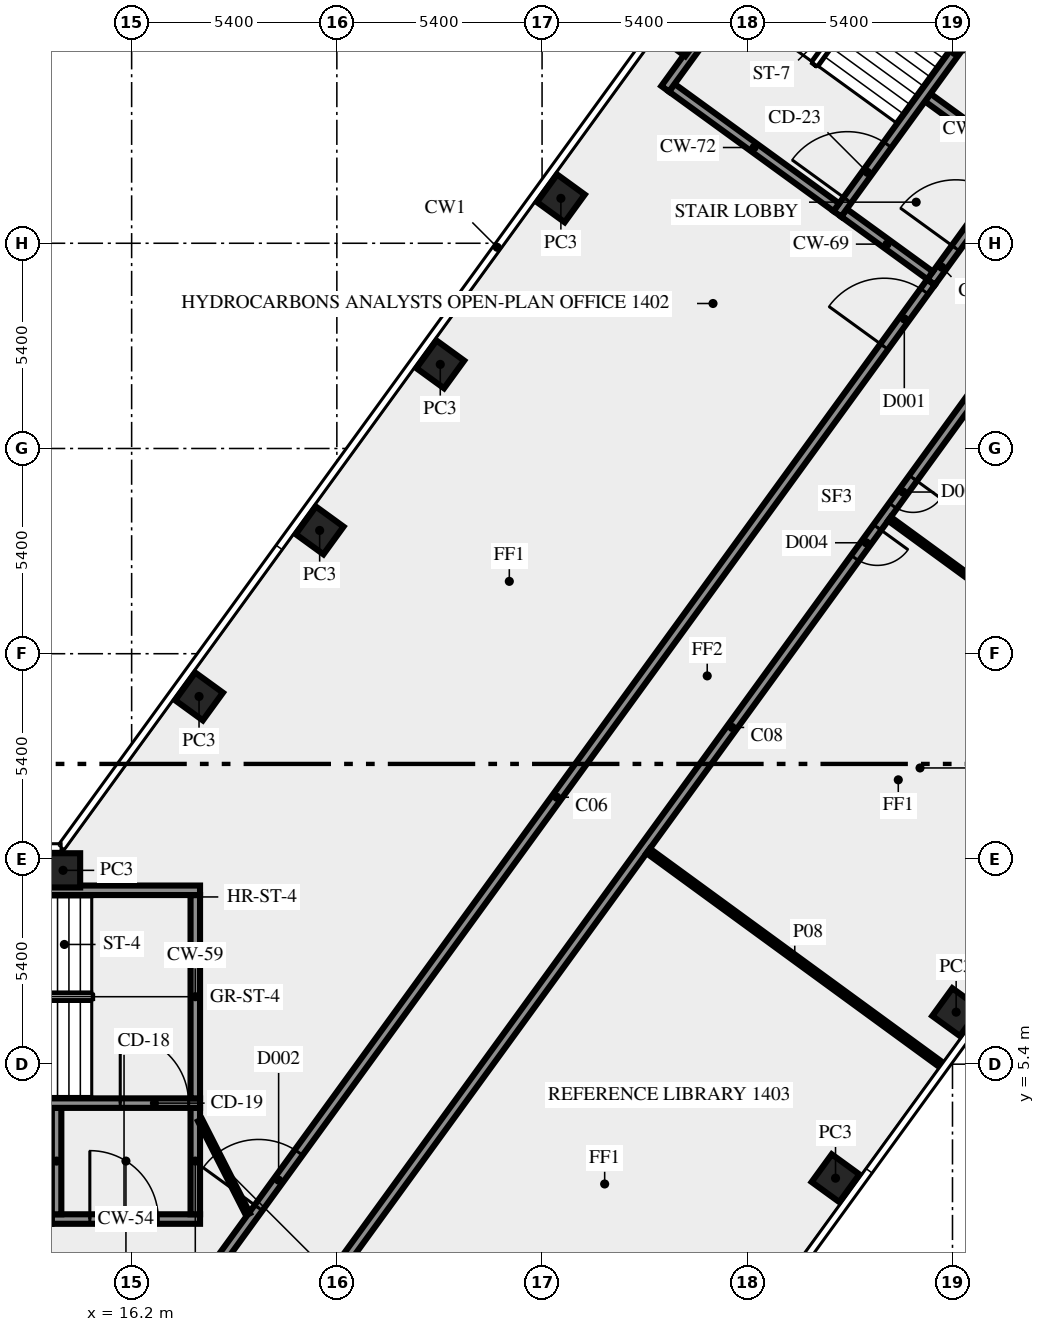
"""IFC4 building model, lengths in metres.
Left out: names, types, materials, properties, quantities, classifications, styles, units other than length and angle.
Written with IfcOpenShell. Run it as: python <this file> out.ifc"""

import sys

from ifc_helpers import new_model, si_unit, direction, frame, frame_2d, origin, origin_2d, place, context, subcontext, project, spatial, rectangle, extrude, element, fill, save


model = new_model("IFC4")
c1 = context("Model", 3, precision=1e-05, world=origin(), true_north=direction((0.0, 1.0)))
c2 = subcontext(c1, "Body", "Model", "MODEL_VIEW")
j1 = project(units=[si_unit("LENGTHUNIT", "METRE"), si_unit("PLANEANGLEUNIT", "RADIAN")], contexts=[c1])
p1 = place(None, origin())
s1 = spatial("IfcSite", under=j1, at=p1, CompositionType="ELEMENT")
p2 = place(p1, origin())
s2 = spatial("IfcBuilding", under=s1, at=p2, CompositionType="ELEMENT")
p3 = place(p2, frame((0.0, 0.0, 63.0)))
s3 = spatial("IfcBuildingStorey", under=s2, at=p3, CompositionType="ELEMENT", Elevation=63.0)
for number, where, z_axis, x_axis in (
    (1, (34.722, 2.4, 0.0), (0.0, 0.0, 1.0), (0.588, 0.809, 0.0)),
    (2, (37.896, 6.769, 0.0), (0.0, 0.0, 1.0), (0.588, 0.809, 0.0)),
    (3, (30.669, 32.55, 0.0), (0.0, 0.0, 1.0), (-0.588, -0.809, 0.0)),
    (4, (27.495, 28.181, 0.0), (0.0, 0.0, 1.0), (-0.588, -0.809, 0.0)),
    (5, (24.321, 23.812, 0.0), (0.0, 0.0, 1.0), (-0.588, -0.809, 0.0)),
    (6, (21.147, 19.444, 0.0), (0.0, 0.0, 1.0), (-0.588, -0.809, 0.0)),
    (7, (17.974, 15.075, 0.0), (0.0, 0.0, 1.0), (-0.588, -0.809, 0.0)),
    (8, (14.395, 10.5, 0.0), (0.0, 0.0, 1.0), (-1.0, 0.0, 0.0)),
):
    element("IfcColumn", number, at=place(p3, frame(where, z_axis=z_axis, x_axis=x_axis)), inside=s3, PredefinedType="COLUMN", context=c2, shape_type="SweptSolid", body=[
        extrude(rectangle(XDim=0.9, YDim=0.9, at=origin_2d()), origin(), (0.0, 0.0, 1.0), 3.65),
    ])
p4 = place(p3, frame((14.1, 1.325, 0.0), z_axis=(0.0, 0.0, 1.0), x_axis=(1.0, 0.0, 0.0)))
e9 = element("IfcWall", 9, at=p4, inside=s3, PredefinedType="SHEAR", context=c2, shape_type="SweptSolid", body=[
    extrude(rectangle(XDim=3.9, YDim=0.25, at=frame_2d((1.95, 0.0))), origin(), (0.0, 0.0, 1.0), 3.65),
])
p5 = place(p4, frame((1.0, 0.0, 0.0)))
e10 = element("IfcOpeningElement", 10, at=p5, cuts=e9, PredefinedType="OPENING", context=c2, shape_type="SweptSolid", body=[
    extrude(rectangle(XDim=1.8, YDim=2.1, at=frame_2d((0.9, 1.05))), frame((0.0, 0.135, 0.0), z_axis=(0.0, -1.0, 0.0), x_axis=(1.0, 0.0, 0.0)), (0.0, 0.0, 1.0), 0.27),
])
for number, where, z_axis, x_axis in (
    (11, (14.225, 1.45, 0.0), (0.0, 0.0, 1.0), (0.0, 1.0, 0.0)),
    (12, (17.875, 1.45, 0.0), (0.0, 0.0, 1.0), (0.0, 1.0, 0.0)),
):
    element("IfcWall", number, at=place(p3, frame(where, z_axis=z_axis, x_axis=x_axis)), inside=s3, PredefinedType="SHEAR", context=c2, shape_type="SweptSolid", body=[
        extrude(rectangle(XDim=2.8, YDim=0.25, at=frame_2d((1.4, 0.0))), origin(), (0.0, 0.0, 1.0), 3.65),
    ])
p6 = place(p3, frame((7.5, 4.375, 0.0), z_axis=(0.0, 0.0, 1.0), x_axis=(1.0, 0.0, 0.0)))
e13 = element("IfcWall", 13, at=p6, inside=s3, PredefinedType="SHEAR", context=c2, shape_type="SweptSolid", body=[
    extrude(rectangle(XDim=10.5, YDim=0.25, at=frame_2d((5.25, 0.0))), origin(), (0.0, 0.0, 1.0), 3.65),
])
p7 = place(p6, frame((8.4, 0.0, 0.0)))
e14 = element("IfcOpeningElement", 14, at=p7, cuts=e13, PredefinedType="OPENING", context=c2, shape_type="SweptSolid", body=[
    extrude(rectangle(XDim=1.8, YDim=2.1, at=frame_2d((0.9, 1.05))), frame((0.0, 0.135, 0.0), z_axis=(0.0, -1.0, 0.0), x_axis=(1.0, 0.0, 0.0)), (0.0, 0.0, 1.0), 0.27),
])
p8 = place(p3, frame((17.875, 4.5, 0.0), z_axis=(0.0, 0.0, 1.0), x_axis=(0.0, 1.0, 0.0)))
e15 = element("IfcWall", 15, at=p8, inside=s3, PredefinedType="SHEAR", context=c2, shape_type="SweptSolid", body=[
    extrude(rectangle(XDim=5.35, YDim=0.25, at=frame_2d((2.675, 0.0))), origin(), (0.0, 0.0, 1.0), 3.65),
])
p9 = place(p3, frame((7.5, 9.975, 0.0), z_axis=(0.0, 0.0, 1.0), x_axis=(1.0, 0.0, 0.0)))
e16 = element("IfcWall", 16, at=p9, inside=s3, PredefinedType="SHEAR", context=c2, shape_type="SweptSolid", body=[
    extrude(rectangle(XDim=10.5, YDim=0.25, at=frame_2d((5.25, 0.0))), origin(), (0.0, 0.0, 1.0), 3.65),
])
p10 = place(p9, frame((2.0, 0.0, 1.0)))
e17 = element("IfcOpeningElement", 17, at=p10, cuts=e16, PredefinedType="OPENING", context=c2, shape_type="SweptSolid", body=[
    extrude(rectangle(XDim=1.2, YDim=1.2, at=frame_2d((0.6, 0.6))), frame((0.0, 0.135, 0.0), z_axis=(0.0, -1.0, 0.0), x_axis=(1.0, 0.0, 0.0)), (0.0, 0.0, 1.0), 0.27),
])
p11 = place(p3, frame((37.238, 25.98, 0.0), z_axis=(0.0, 0.0, 1.0), x_axis=(0.587772420479, 0.809026317077, 0.0)))
e18 = element("IfcWall", 18, at=p11, inside=s3, PredefinedType="SHEAR", context=c2, shape_type="SweptSolid", body=[
    extrude(rectangle(XDim=4.0, YDim=0.25, at=frame_2d((2.0, 0.0))), origin(), (0.0, 0.0, 1.0), 3.65),
])
p12 = place(p11, frame((1.1, 0.0, 0.0)))
e19 = element("IfcOpeningElement", 19, at=p12, cuts=e18, PredefinedType="OPENING", context=c2, shape_type="SweptSolid", body=[
    extrude(rectangle(XDim=1.8, YDim=2.1, at=frame_2d((0.9, 1.05))), frame((0.0, 0.135, 0.0), z_axis=(0.0, -1.0, 0.0), x_axis=(1.0, 0.0, 0.0)), (0.0, 0.0, 1.0), 0.27),
])
for number, where, z_axis, x_axis in (
    (20, (37.21, 26.154, 0.0), (0.0, 0.0, 1.0), (-0.809, 0.588, 0.0)),
    (21, (39.414, 29.188, 0.0), (0.0, 0.0, 1.0), (-0.809, 0.588, 0.0)),
):
    element("IfcWall", number, at=place(p3, frame(where, z_axis=z_axis, x_axis=x_axis)), inside=s3, PredefinedType="SHEAR", context=c2, shape_type="SweptSolid", body=[
        extrude(rectangle(XDim=2.8, YDim=0.25, at=frame_2d((1.4, 0.0))), origin(), (0.0, 0.0, 1.0), 3.65),
    ])
p13 = place(p3, frame((34.77, 27.772, 0.0), z_axis=(0.0, 0.0, 1.0), x_axis=(0.587795589702, 0.809009483706, 0.0)))
e22 = element("IfcWall", 22, at=p13, inside=s3, PredefinedType="SHEAR", context=c2, shape_type="SweptSolid", body=[
    extrude(rectangle(XDim=10.5, YDim=0.25, at=frame_2d((5.25, 0.0))), origin(), (0.0, 0.0, 1.0), 3.65),
])
p14 = place(p13, frame((0.45, 0.0, 0.0)))
e23 = element("IfcOpeningElement", 23, at=p14, cuts=e22, PredefinedType="OPENING", context=c2, shape_type="SweptSolid", body=[
    extrude(rectangle(XDim=1.8, YDim=2.1, at=frame_2d((0.9, 1.05))), frame((0.0, 0.135, 0.0), z_axis=(0.0, -1.0, 0.0), x_axis=(1.0, 0.0, 0.0)), (0.0, 0.0, 1.0), 0.27),
])
p15 = place(p3, frame((34.742, 27.947, 0.0), z_axis=(0.0, 0.0, 1.0), x_axis=(-0.8089984606, 0.587810760999, 0.0)))
e24 = element("IfcWall", 24, at=p15, inside=s3, PredefinedType="SHEAR", context=c2, shape_type="SweptSolid", body=[
    extrude(rectangle(XDim=5.35, YDim=0.25, at=frame_2d((2.675, 0.0))), origin(), (0.0, 0.0, 1.0), 3.65),
])
p16 = place(p3, frame((30.24, 31.064, 0.0), z_axis=(0.0, 0.0, 1.0), x_axis=(0.587795589702, 0.809009483706, 0.0)))
e25 = element("IfcWall", 25, at=p16, inside=s3, PredefinedType="SHEAR", context=c2, shape_type="SweptSolid", body=[
    extrude(rectangle(XDim=10.5, YDim=0.25, at=frame_2d((5.25, 0.0))), origin(), (0.0, 0.0, 1.0), 3.65),
])
p17 = place(p16, frame((2.15, 0.0, 1.0)))
e26 = element("IfcOpeningElement", 26, at=p17, cuts=e25, PredefinedType="OPENING", context=c2, shape_type="SweptSolid", body=[
    extrude(rectangle(XDim=1.2, YDim=1.2, at=frame_2d((0.6, 0.6))), frame((0.0, 0.135, 0.0), z_axis=(0.0, -1.0, 0.0), x_axis=(1.0, 0.0, 0.0)), (0.0, 0.0, 1.0), 0.27),
])
p18 = place(p3, frame((17.545, -1.125, 0.0), z_axis=(0.0, 0.0, 1.0), x_axis=(0.587786323093, 0.809016216391, 0.0)))
e27 = element("IfcWall", 27, at=p18, inside=s3, PredefinedType="SOLIDWALL", context=c2, shape_type="SweptSolid", body=[
    extrude(rectangle(XDim=33.493, YDim=0.25, at=frame_2d((16.747, 0.0))), origin(), (0.0, 0.0, 1.0), 3.65),
])
p19 = place(p18, frame((31.403, 0.0, 0.0)))
e28 = element("IfcOpeningElement", 28, at=p19, cuts=e27, PredefinedType="OPENING", context=c2, shape_type="SweptSolid", body=[
    extrude(rectangle(XDim=1.8, YDim=2.1, at=frame_2d((0.9, 1.05))), frame((0.0, 0.135, 0.0), z_axis=(0.0, -1.0, 0.0), x_axis=(1.0, 0.0, 0.0)), (0.0, 0.0, 1.0), 0.27),
])
p20 = place(p18, frame((3.392, 0.0, 0.0)))
e29 = element("IfcOpeningElement", 29, at=p20, cuts=e27, PredefinedType="OPENING", context=c2, shape_type="SweptSolid", body=[
    extrude(rectangle(XDim=1.8, YDim=2.1, at=frame_2d((0.9, 1.05))), frame((0.0, 0.135, 0.0), z_axis=(0.0, -1.0, 0.0), x_axis=(1.0, 0.0, 0.0)), (0.0, 0.0, 1.0), 0.27),
])
p21 = place(p3, frame((43.467, 30.045, 0.0), z_axis=(0.0, 0.0, 1.0), x_axis=(-0.587784726077, -0.809017376692, 0.0)))
e30 = element("IfcWall", 30, at=p21, inside=s3, PredefinedType="SOLIDWALL", context=c2, shape_type="SweptSolid", body=[
    extrude(rectangle(XDim=39.02, YDim=0.25, at=frame_2d((19.51, 0.0))), origin(), (0.0, 0.0, 1.0), 3.65),
])
p22 = place(p21, frame((11.404, 0.0, 0.0)))
e31 = element("IfcOpeningElement", 31, at=p22, cuts=e30, PredefinedType="OPENING", context=c2, shape_type="SweptSolid", body=[
    extrude(rectangle(XDim=0.9, YDim=2.1, at=frame_2d((0.45, 1.05))), frame((0.0, 0.135, 0.0), z_axis=(0.0, -1.0, 0.0), x_axis=(1.0, 0.0, 0.0)), (0.0, 0.0, 1.0), 0.27),
])
p23 = place(p21, frame((13.004, 0.0, 0.0)))
e32 = element("IfcOpeningElement", 32, at=p23, cuts=e30, PredefinedType="OPENING", context=c2, shape_type="SweptSolid", body=[
    extrude(rectangle(XDim=1.0, YDim=2.1, at=frame_2d((0.5, 1.05))), frame((0.0, 0.135, 0.0), z_axis=(0.0, -1.0, 0.0), x_axis=(1.0, 0.0, 0.0)), (0.0, 0.0, 1.0), 0.27),
])
p24 = place(p21, frame((37.287, 0.0, 0.0)))
e33 = element("IfcOpeningElement", 33, at=p24, cuts=e30, PredefinedType="OPENING", context=c2, shape_type="SweptSolid", body=[
    extrude(rectangle(XDim=1.2, YDim=2.1, at=frame_2d((0.6, 1.05))), frame((0.0, 0.135, 0.0), z_axis=(0.0, -1.0, 0.0), x_axis=(1.0, 0.0, 0.0)), (0.0, 0.0, 1.0), 0.27),
])
p25 = place(p21, frame((0.224, 0.0, 0.0)))
e34 = element("IfcOpeningElement", 34, at=p25, cuts=e30, PredefinedType="OPENING", context=c2, shape_type="SweptSolid", body=[
    extrude(rectangle(XDim=0.9, YDim=2.1, at=frame_2d((0.45, 1.05))), frame((0.0, 0.135, 0.0), z_axis=(0.0, -1.0, 0.0), x_axis=(1.0, 0.0, 0.0)), (0.0, 0.0, 1.0), 0.27),
])
p26 = place(p3, frame((36.141, 19.749, 0.0), z_axis=(0.0, 0.0, 1.0), x_axis=(0.807691251741, -0.589605666408, 0.0)))
e35 = element("IfcWall", 35, at=p26, inside=s3, PredefinedType="PARTITIONING", context=c2, shape_type="SweptSolid", body=[
    extrude(rectangle(XDim=9.55, YDim=0.12, at=frame_2d((4.775, 0.0))), origin(), (0.0, 0.0, 1.0), 2.75),
])
p27 = place(p3, frame((29.793, 11.012, 0.0), z_axis=(0.0, 0.0, 1.0), x_axis=(0.807645841498, -0.589667868135, 0.0)))
e36 = element("IfcWall", 36, at=p27, inside=s3, PredefinedType="PARTITIONING", context=c2, shape_type="SweptSolid", body=[
    extrude(rectangle(XDim=9.551, YDim=0.15, at=frame_2d((4.775, 0.0))), origin(), (0.0, 0.0, 1.0), 2.75),
])
p28 = place(p3, frame((18.0, 3.925, 0.0), z_axis=(0.0, 0.0, 1.0), x_axis=(0.453950796792, -0.891026752736, 0.0)))
e37 = element("IfcWall", 37, at=p28, inside=s3, PredefinedType="PARTITIONING", context=c2, shape_type="SweptSolid", body=[
    extrude(rectangle(XDim=2.778, YDim=0.12, at=frame_2d((1.389, 0.0))), origin(), (0.0, 0.0, 1.0), 3.65),
])
p29 = place(p5, origin())
e38 = element("IfcDoor", 38, at=p29, inside=s3, OperationType="DOUBLE_DOOR_SINGLE_SWING", PredefinedType="DOOR", context=c2, shape_type="SweptSolid", body=[
    extrude(rectangle(XDim=1.8, YDim=2.1, at=frame_2d((0.9, 1.05))), frame((0.0, 0.025, 0.0), z_axis=(0.0, -1.0, 0.0), x_axis=(1.0, 0.0, 0.0)), (0.0, 0.0, 1.0), 0.05),
])
fill(e10, e38)
p30 = place(p7, origin())
e39 = element("IfcDoor", 39, at=p30, inside=s3, OperationType="DOUBLE_DOOR_SINGLE_SWING", PredefinedType="DOOR", context=c2, shape_type="SweptSolid", body=[
    extrude(rectangle(XDim=1.8, YDim=2.1, at=frame_2d((0.9, 1.05))), frame((0.0, 0.025, 0.0), z_axis=(0.0, -1.0, 0.0), x_axis=(1.0, 0.0, 0.0)), (0.0, 0.0, 1.0), 0.05),
])
fill(e14, e39)
p31 = place(p12, origin())
e40 = element("IfcDoor", 40, at=p31, inside=s3, OperationType="DOUBLE_DOOR_SINGLE_SWING", PredefinedType="DOOR", context=c2, shape_type="SweptSolid", body=[
    extrude(rectangle(XDim=1.8, YDim=2.1, at=frame_2d((0.9, 1.05))), frame((0.0, 0.025, 0.0), z_axis=(0.0, -1.0, 0.0), x_axis=(1.0, 0.0, 0.0)), (0.0, 0.0, 1.0), 0.05),
])
fill(e19, e40)
p32 = place(p14, origin())
e41 = element("IfcDoor", 41, at=p32, inside=s3, OperationType="DOUBLE_DOOR_SINGLE_SWING", PredefinedType="DOOR", context=c2, shape_type="SweptSolid", body=[
    extrude(rectangle(XDim=1.8, YDim=2.1, at=frame_2d((0.9, 1.05))), frame((0.0, 0.025, 0.0), z_axis=(0.0, -1.0, 0.0), x_axis=(1.0, 0.0, 0.0)), (0.0, 0.0, 1.0), 0.05),
])
fill(e23, e41)
p33 = place(p19, origin())
e42 = element("IfcDoor", 42, at=p33, inside=s3, OperationType="DOUBLE_DOOR_SINGLE_SWING", PredefinedType="DOOR", context=c2, shape_type="SweptSolid", body=[
    extrude(rectangle(XDim=1.8, YDim=2.1, at=frame_2d((0.9, 1.05))), frame((0.0, 0.025, 0.0), z_axis=(0.0, -1.0, 0.0), x_axis=(1.0, 0.0, 0.0)), (0.0, 0.0, 1.0), 0.05),
])
fill(e28, e42)
p34 = place(p20, origin())
e43 = element("IfcDoor", 43, at=p34, inside=s3, OperationType="DOUBLE_DOOR_SINGLE_SWING", PredefinedType="DOOR", context=c2, shape_type="SweptSolid", body=[
    extrude(rectangle(XDim=1.8, YDim=2.1, at=frame_2d((0.9, 1.05))), frame((0.0, 0.025, 0.0), z_axis=(0.0, -1.0, 0.0), x_axis=(1.0, 0.0, 0.0)), (0.0, 0.0, 1.0), 0.05),
])
fill(e29, e43)
p35 = place(p22, origin())
e44 = element("IfcDoor", 44, at=p35, inside=s3, OperationType="SINGLE_SWING_RIGHT", PredefinedType="DOOR", context=c2, shape_type="SweptSolid", body=[
    extrude(rectangle(XDim=0.9, YDim=2.1, at=frame_2d((0.45, 1.05))), frame((0.0, 0.025, 0.0), z_axis=(0.0, -1.0, 0.0), x_axis=(1.0, 0.0, 0.0)), (0.0, 0.0, 1.0), 0.05),
])
fill(e31, e44)
p36 = place(p23, origin())
e45 = element("IfcDoor", 45, at=p36, inside=s3, OperationType="SINGLE_SWING_LEFT", PredefinedType="DOOR", context=c2, shape_type="SweptSolid", body=[
    extrude(rectangle(XDim=1.0, YDim=2.1, at=frame_2d((0.5, 1.05))), frame((0.0, 0.025, 0.0), z_axis=(0.0, -1.0, 0.0), x_axis=(1.0, 0.0, 0.0)), (0.0, 0.0, 1.0), 0.05),
])
fill(e32, e45)
save(model, sys.argv[1])
